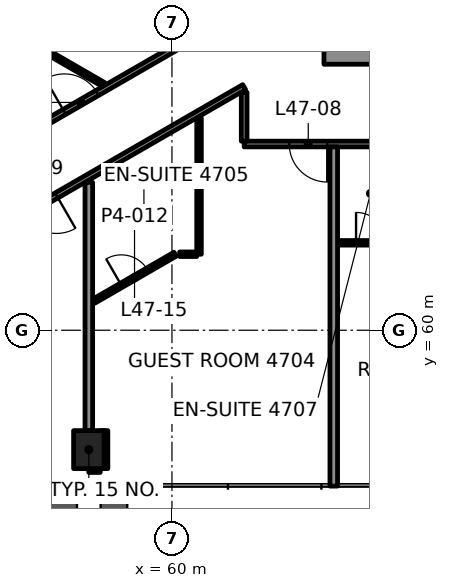
"""IFC4 building model, lengths in metres.
Left out: names, types, materials, properties, quantities, classifications, styles, units other than length and angle.
Written with IfcOpenShell. Run it as: python <this file> out.ifc"""

import sys

from ifc_helpers import new_model, si_unit, direction, frame, frame_2d, origin, origin_2d, place, context, subcontext, project, spatial, rectangle, hollow_rectangle, extrude, element, fill, save


model = new_model("IFC4")
c1 = context("Model", 3, precision=1e-05, world=origin(), true_north=direction((0.0, 1.0)))
c2 = subcontext(c1, "Body", "Model", "MODEL_VIEW")
j1 = project(units=[si_unit("LENGTHUNIT", "METRE"), si_unit("PLANEANGLEUNIT", "RADIAN")], contexts=[c1])
p1 = place(None, origin())
s1 = spatial("IfcSite", under=j1, at=p1, CompositionType="ELEMENT")
p2 = place(p1, origin())
s2 = spatial("IfcBuilding", under=s1, at=p2, CompositionType="ELEMENT")
p3 = place(p2, frame((0.0, 0.0, 202.6)))
s3 = spatial("IfcBuildingStorey", under=s2, at=p3, CompositionType="ELEMENT", Elevation=202.6)
p4 = place(p3, frame((57.812, 56.858, -0.0), z_axis=(0.0, 0.0, 1.0), x_axis=(1.0, 0.0, 0.0)))
e1 = element("IfcColumn", 1, at=p4, inside=s3, PredefinedType="COLUMN", context=c2, shape_type="SweptSolid", body=[
    extrude(hollow_rectangle(XDim=0.8, YDim=1.0, WallThickness=0.05, at=origin_2d()), origin(), (0.0, 0.0, 1.0), 3.9),
])
p5 = place(p3, frame((64.0, 67.375, 0.0), z_axis=(0.0, 0.0, 1.0), x_axis=(1.0, 0.0, 0.0)))
e2 = element("IfcWall", 2, at=p5, inside=s3, PredefinedType="SHEAR", context=c2, shape_type="SweptSolid", body=[
    extrude(rectangle(XDim=22.0, YDim=0.75, at=frame_2d((11.0, 0.0))), origin(), (0.0, 0.0, 1.0), 3.7),
])
p6 = place(p5, frame((3.15, 0.0, 0.0)))
e3 = element("IfcOpeningElement", 3, at=p6, cuts=e2, PredefinedType="OPENING", context=c2, shape_type="SweptSolid", body=[
    extrude(rectangle(XDim=0.9, YDim=2.1, at=frame_2d((0.45, 1.05))), frame((0.0, 0.385, 0.0), z_axis=(0.0, -1.0, 0.0), x_axis=(1.0, 0.0, 0.0)), (0.0, 0.0, 1.0), 0.77),
])
p7 = place(p3, frame((57.812, 56.358, 0.0), z_axis=(0.0, 0.0, 1.0), x_axis=(1.0, 0.0, 0.0)))
e4 = element("IfcWall", 4, at=p7, inside=s3, PredefinedType="PARTITIONING", context=c2, shape_type="SweptSolid", body=[
    extrude(rectangle(XDim=0.3, YDim=0.2, at=frame_2d((0.15, 0.0))), origin(), (0.0, 0.0, 1.0), 3.1),
])
p8 = place(p3, frame((60.203, 62.0, 0.0), z_axis=(0.0, 0.0, 1.0), x_axis=(1.0, 0.0, 0.0)))
e5 = element("IfcWall", 5, at=p8, inside=s3, PredefinedType="PARTITIONING", context=c2, shape_type="SweptSolid", body=[
    extrude(rectangle(XDim=0.449, YDim=0.12, at=frame_2d((0.225, 0.0))), origin(), (0.0, 0.0, 1.0), 3.1),
])
p9 = place(p3, frame((64.368, 62.3, 0.0), z_axis=(0.0, 0.0, 1.0), x_axis=(1.0, 0.0, 0.0)))
e6 = element("IfcWall", 6, at=p9, inside=s3, PredefinedType="PARTITIONING", context=c2, shape_type="SweptSolid", body=[
    extrude(rectangle(XDim=1.753, YDim=0.12, at=frame_2d((0.877, 0.0))), origin(), (0.0, 0.0, 1.0), 3.1),
])
p10 = place(p9, frame((0.477, 0.0, 0.0)))
e7 = element("IfcOpeningElement", 7, at=p10, cuts=e6, PredefinedType="OPENING", context=c2, shape_type="SweptSolid", body=[
    extrude(rectangle(XDim=0.8, YDim=2.1, at=frame_2d((0.4, 1.05))), frame((0.0, 0.07, 0.0), z_axis=(0.0, -1.0, 0.0), x_axis=(1.0, 0.0, 0.0)), (0.0, 0.0, 1.0), 0.14),
])
p11 = place(p3, frame((88.1, 64.9, 0.0), z_axis=(0.0, 0.0, 1.0), x_axis=(-1.0, 0.0, 0.0)))
e8 = element("IfcWall", 8, at=p11, inside=s3, PredefinedType="PARTITIONING", context=c2, shape_type="SweptSolid", body=[
    extrude(rectangle(XDim=26.2, YDim=0.15, at=frame_2d((13.1, 0.0))), origin(), (0.0, 0.0, 1.0), 3.1),
])
p12 = place(p11, frame((7.443, 0.0, 0.0)))
e9 = element("IfcOpeningElement", 9, at=p12, cuts=e8, PredefinedType="OPENING", context=c2, shape_type="SweptSolid", body=[
    extrude(rectangle(XDim=1.0, YDim=2.1, at=frame_2d((0.5, 1.05))), frame((0.0, 0.085, 0.0), z_axis=(0.0, -1.0, 0.0), x_axis=(1.0, 0.0, 0.0)), (0.0, 0.0, 1.0), 0.17),
])
p13 = place(p11, frame((16.037, 0.0, 0.0)))
e10 = element("IfcOpeningElement", 10, at=p13, cuts=e8, PredefinedType="OPENING", context=c2, shape_type="SweptSolid", body=[
    extrude(rectangle(XDim=1.0, YDim=2.1, at=frame_2d((0.5, 1.05))), frame((0.0, 0.085, 0.0), z_axis=(0.0, -1.0, 0.0), x_axis=(1.0, 0.0, 0.0)), (0.0, 0.0, 1.0), 0.17),
])
p14 = place(p11, frame((19.747, 0.0, 0.0)))
e11 = element("IfcOpeningElement", 11, at=p14, cuts=e8, PredefinedType="OPENING", context=c2, shape_type="SweptSolid", body=[
    extrude(rectangle(XDim=1.0, YDim=2.1, at=frame_2d((0.5, 1.05))), frame((0.0, 0.085, 0.0), z_axis=(0.0, -1.0, 0.0), x_axis=(1.0, 0.0, 0.0)), (0.0, 0.0, 1.0), 0.17),
])
p15 = place(p11, frame((24.013, 0.0, 0.0)))
e12 = element("IfcOpeningElement", 12, at=p15, cuts=e8, PredefinedType="OPENING", context=c2, shape_type="SweptSolid", body=[
    extrude(rectangle(XDim=1.0, YDim=2.1, at=frame_2d((0.5, 1.05))), frame((0.0, 0.085, 0.0), z_axis=(0.0, -1.0, 0.0), x_axis=(1.0, 0.0, 0.0)), (0.0, 0.0, 1.0), 0.17),
])
p16 = place(p3, frame((57.947, 60.767, 0.0), z_axis=(0.0, 0.0, 1.0), x_axis=(0.866060325455, 0.499939509014, 0.0)))
e13 = element("IfcWall", 13, at=p16, inside=s3, PredefinedType="PARTITIONING", context=c2, shape_type="SweptSolid", body=[
    extrude(rectangle(XDim=2.467, YDim=0.12, at=frame_2d((1.233, 0.0))), origin(), (0.0, 0.0, 1.0), 3.1),
])
p17 = place(p16, frame((0.833, 0.0, 0.0)))
e14 = element("IfcOpeningElement", 14, at=p17, cuts=e13, PredefinedType="OPENING", context=c2, shape_type="SweptSolid", body=[
    extrude(rectangle(XDim=0.8, YDim=2.1, at=frame_2d((0.4, 1.05))), frame((0.0, 0.07, 0.0), z_axis=(0.0, -1.0, 0.0), x_axis=(1.0, 0.0, 0.0)), (0.0, 0.0, 1.0), 0.14),
])
p18 = place(p3, frame((61.9, 66.397, 0.0), z_axis=(0.0, 0.0, 1.0), x_axis=(-0.866028610752, -0.499994445327, 0.0)))
e15 = element("IfcWall", 15, at=p18, inside=s3, PredefinedType="PARTITIONING", context=c2, shape_type="SweptSolid", body=[
    extrude(rectangle(XDim=13.002, YDim=0.15, at=frame_2d((6.501, 0.0))), origin(), (0.0, 0.0, 1.0), 2.947),
])
p19 = place(p18, frame((5.701, 0.0, 0.0)))
e16 = element("IfcOpeningElement", 16, at=p19, cuts=e15, PredefinedType="OPENING", context=c2, shape_type="SweptSolid", body=[
    extrude(rectangle(XDim=1.0, YDim=2.1, at=frame_2d((0.5, 1.05))), frame((0.0, 0.085, 0.0), z_axis=(0.0, -1.0, 0.0), x_axis=(1.0, 0.0, 0.0)), (0.0, 0.0, 1.0), 0.17),
])
p20 = place(p3, frame((49.74, 61.456, 0.0), z_axis=(0.0, 0.0, 1.0), x_axis=(0.866030582951, 0.499991029314, 0.0)))
e17 = element("IfcWall", 17, at=p20, inside=s3, PredefinedType="PARTITIONING", context=c2, shape_type="SweptSolid", body=[
    extrude(rectangle(XDim=13.954, YDim=0.15, at=frame_2d((6.977, 0.0))), origin(), (0.0, 0.0, 1.0), 3.1),
])
p21 = place(p20, frame((2.552, 0.0, 0.0)))
e18 = element("IfcOpeningElement", 18, at=p21, cuts=e17, PredefinedType="OPENING", context=c2, shape_type="SweptSolid", body=[
    extrude(rectangle(XDim=0.9, YDim=2.1, at=frame_2d((0.45, 1.05))), frame((0.0, 0.085, 0.0), z_axis=(0.0, -1.0, 0.0), x_axis=(1.0, 0.0, 0.0)), (0.0, 0.0, 1.0), 0.17),
])
p22 = place(p20, frame((8.579, 0.0, 0.0)))
e19 = element("IfcOpeningElement", 19, at=p22, cuts=e17, PredefinedType="OPENING", context=c2, shape_type="SweptSolid", body=[
    extrude(rectangle(XDim=1.0, YDim=2.1, at=frame_2d((0.5, 1.05))), frame((0.0, 0.085, 0.0), z_axis=(0.0, -1.0, 0.0), x_axis=(1.0, 0.0, 0.0)), (0.0, 0.0, 1.0), 0.17),
])
p23 = place(p3, frame((64.258, 55.898, 0.0), z_axis=(0.0, 0.0, 1.0), x_axis=(0.0, 1.0, 0.0)))
e20 = element("IfcWall", 20, at=p23, inside=s3, PredefinedType="PARTITIONING", context=c2, shape_type="SweptSolid", body=[
    extrude(rectangle(XDim=8.927, YDim=0.2, at=frame_2d((4.463, 0.0))), origin(), (0.0, 0.0, 1.0), 3.022),
])
p24 = place(p3, frame((61.9, 64.975, 0.0), z_axis=(0.0, 0.0, 1.0), x_axis=(0.0, 1.0, 0.0)))
e21 = element("IfcWall", 21, at=p24, inside=s3, PredefinedType="PARTITIONING", context=c2, shape_type="SweptSolid", body=[
    extrude(rectangle(XDim=1.286, YDim=0.15, at=frame_2d((0.643, 0.0))), origin(), (0.0, 0.0, 1.0), 2.947),
])
p25 = place(p3, frame((60.713, 62.0, 0.0), z_axis=(0.0, 0.0, 1.0), x_axis=(0.0, 1.0, 0.0)))
e22 = element("IfcWall", 22, at=p25, inside=s3, PredefinedType="PARTITIONING", context=c2, shape_type="SweptSolid", body=[
    extrude(rectangle(XDim=3.585, YDim=0.12, at=frame_2d((1.793, 0.0))), origin(), (0.0, 0.0, 1.0), 2.947),
])
p26 = place(p3, frame((58.213, 56.358, 0.0), z_axis=(0.0, 0.0, 1.0), x_axis=(0.0, 1.0, 0.0)))
e23 = element("IfcWall", 23, at=p26, inside=s3, PredefinedType="PARTITIONING", context=c2, shape_type="SweptSolid", body=[
    extrude(rectangle(XDim=1.0, YDim=0.2, at=frame_2d((0.5, 0.0))), origin(), (0.0, 0.0, 1.0), 3.022),
])
p27 = place(p3, frame((57.813, 57.358, 0.0), z_axis=(0.0, 0.0, 1.0), x_axis=(0.0, 1.0, 0.0)))
e24 = element("IfcWall", 24, at=p27, inside=s3, PredefinedType="PARTITIONING", context=c2, shape_type="SweptSolid", body=[
    extrude(rectangle(XDim=6.532, YDim=0.2, at=frame_2d((3.266, 0.0))), origin(), (0.0, 0.0, 1.0), 3.1),
])
p28 = place(p3, frame((58.199, 66.466, 0.0), z_axis=(0.0, 0.0, 1.0), x_axis=(-0.866028856698, 0.499994019331, 0.0)))
e25 = element("IfcWall", 25, at=p28, inside=s3, PredefinedType="PARTITIONING", context=c2, shape_type="SweptSolid", body=[
    extrude(rectangle(XDim=3.113, YDim=0.12, at=frame_2d((1.556, 0.0))), origin(), (0.0, 0.0, 1.0), 3.1),
])
p29 = place(p10, origin())
e26 = element("IfcDoor", 26, at=p29, inside=s3, OperationType="SINGLE_SWING_RIGHT", PredefinedType="DOOR", context=c2, shape_type="SweptSolid", body=[
    extrude(rectangle(XDim=0.8, YDim=2.1, at=frame_2d((0.4, 1.05))), frame((0.0, 0.025, 0.0), z_axis=(0.0, -1.0, 0.0), x_axis=(1.0, 0.0, 0.0)), (0.0, 0.0, 1.0), 0.05),
])
fill(e7, e26)
p30 = place(p15, origin())
e27 = element("IfcDoor", 27, at=p30, inside=s3, OperationType="SINGLE_SWING_RIGHT", PredefinedType="DOOR", context=c2, shape_type="SweptSolid", body=[
    extrude(rectangle(XDim=1.0, YDim=2.1, at=frame_2d((0.5, 1.05))), frame((0.0, 0.025, 0.0), z_axis=(0.0, -1.0, 0.0), x_axis=(1.0, 0.0, 0.0)), (0.0, 0.0, 1.0), 0.05),
])
fill(e12, e27)
p31 = place(p17, origin())
e28 = element("IfcDoor", 28, at=p31, inside=s3, OperationType="SINGLE_SWING_RIGHT", PredefinedType="DOOR", context=c2, shape_type="SweptSolid", body=[
    extrude(rectangle(XDim=0.8, YDim=2.1, at=frame_2d((0.4, 1.05))), frame((0.0, 0.025, 0.0), z_axis=(0.0, -1.0, 0.0), x_axis=(1.0, 0.0, 0.0)), (0.0, 0.0, 1.0), 0.05),
])
fill(e14, e28)
p32 = place(p19, origin())
e29 = element("IfcDoor", 29, at=p32, inside=s3, OperationType="SINGLE_SWING_RIGHT", PredefinedType="DOOR", context=c2, shape_type="SweptSolid", body=[
    extrude(rectangle(XDim=1.0, YDim=2.1, at=frame_2d((0.5, 1.05))), frame((0.0, 0.025, 0.0), z_axis=(0.0, -1.0, 0.0), x_axis=(1.0, 0.0, 0.0)), (0.0, 0.0, 1.0), 0.05),
])
fill(e16, e29)
p33 = place(p22, origin())
e30 = element("IfcDoor", 30, at=p33, inside=s3, OperationType="SINGLE_SWING_RIGHT", PredefinedType="DOOR", context=c2, shape_type="SweptSolid", body=[
    extrude(rectangle(XDim=1.0, YDim=2.1, at=frame_2d((0.5, 1.05))), frame((0.0, 0.025, 0.0), z_axis=(0.0, -1.0, 0.0), x_axis=(1.0, 0.0, 0.0)), (0.0, 0.0, 1.0), 0.05),
])
fill(e19, e30)
save(model, sys.argv[1])
